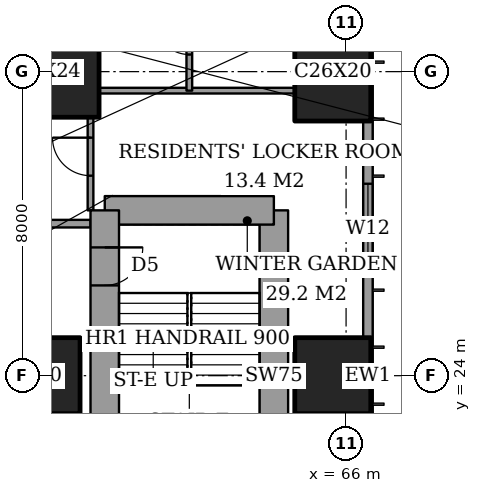
"""IFC4 building model, lengths in metres.
Left out: names, types, materials, properties, quantities, classifications, styles, units other than length and angle.
Written with IfcOpenShell. Run it as: python <this file> out.ifc"""

import sys

from ifc_helpers import new_model, si_unit, direction, frame, frame_2d, origin, origin_2d, place, context, subcontext, project, spatial, rectangle, extrude, element, fill, save


model = new_model("IFC4")
c1 = context("Model", 3, precision=1e-05, world=origin(), true_north=direction((0.0, 1.0)))
c2 = subcontext(c1, "Body", "Model", "MODEL_VIEW")
j1 = project(units=[si_unit("LENGTHUNIT", "METRE"), si_unit("PLANEANGLEUNIT", "RADIAN")], contexts=[c1])
p1 = place(None, origin())
s1 = spatial("IfcSite", under=j1, at=p1, CompositionType="ELEMENT")
p2 = place(p1, origin())
s2 = spatial("IfcBuilding", under=s1, at=p2, CompositionType="ELEMENT")
p3 = place(p2, frame((0.0, 0.0, 139.4)))
s3 = spatial("IfcBuildingStorey", under=s2, at=p3, CompositionType="ELEMENT", Elevation=139.4)
p4 = place(p3, frame((58.0, 24.0, 0.0), z_axis=(0.0, 0.0, 1.0), x_axis=(1.0, 0.0, 0.0)))
e1 = element("IfcColumn", 1, at=p4, inside=s3, PredefinedType="COLUMN", context=c2, shape_type="SweptSolid", body=[
    extrude(rectangle(XDim=2.0, YDim=2.0, at=origin_2d()), origin(), (0.0, 0.0, 1.0), 3.6),
])
p5 = place(p3, frame((58.0, 32.0, 0.0), z_axis=(0.0, 0.0, 1.0), x_axis=(1.0, 0.0, 0.0)))
e2 = element("IfcColumn", 2, at=p5, inside=s3, PredefinedType="COLUMN", context=c2, shape_type="SweptSolid", body=[
    extrude(rectangle(XDim=3.0, YDim=2.4, at=origin_2d()), origin(), (0.0, 0.0, 1.0), 3.6),
])
p6 = place(p3, frame((65.65, 24.0, 0.0), z_axis=(0.0, 0.0, 1.0), x_axis=(1.0, 0.0, 0.0)))
e3 = element("IfcColumn", 3, at=p6, inside=s3, PredefinedType="COLUMN", context=c2, shape_type="SweptSolid", body=[
    extrude(rectangle(XDim=2.0, YDim=2.0, at=origin_2d()), origin(), (0.0, 0.0, 1.0), 3.6),
])
p7 = place(p3, frame((65.65, 32.0, 0.0), z_axis=(0.0, 0.0, 1.0), x_axis=(0.0, 1.0, 0.0)))
e4 = element("IfcColumn", 4, at=p7, inside=s3, PredefinedType="COLUMN", context=c2, shape_type="SweptSolid", body=[
    extrude(rectangle(XDim=2.6, YDim=2.0, at=origin_2d()), origin(), (0.0, 0.0, 1.0), 3.6),
])
p8 = place(p3, frame((64.1, 19.65, 0.0), z_axis=(0.0, 0.0, 1.0), x_axis=(0.0, 1.0, 0.0)))
e5 = element("IfcWall", 5, at=p8, inside=s3, PredefinedType="SHEAR", context=c2, shape_type="SweptSolid", body=[
    extrude(rectangle(XDim=8.7, YDim=0.75, at=frame_2d((4.35, 0.0))), origin(), (0.0, 0.0, 1.0), 3.6),
])
p9 = place(p3, frame((64.1, 28.35, 0.0), z_axis=(0.0, 0.0, 1.0), x_axis=(-1.0, 0.0, 0.0)))
e6 = element("IfcWall", 6, at=p9, inside=s3, PredefinedType="SHEAR", context=c2, shape_type="SweptSolid", body=[
    extrude(rectangle(XDim=4.45, YDim=0.75, at=frame_2d((2.225, 0.0))), origin(), (0.0, 0.0, 1.0), 3.6),
])
p10 = place(p3, frame((59.65, 28.35, 0.0), z_axis=(0.0, 0.0, 1.0), x_axis=(0.0, -1.0, 0.0)))
e7 = element("IfcWall", 7, at=p10, inside=s3, PredefinedType="SHEAR", context=c2, shape_type="SweptSolid", body=[
    extrude(rectangle(XDim=8.7, YDim=0.75, at=frame_2d((4.35, 0.0))), origin(), (0.0, 0.0, 1.0), 3.6),
])
p11 = place(p10, frame((0.975, 0.0, 0.0)))
e8 = element("IfcOpeningElement", 8, at=p11, cuts=e7, PredefinedType="OPENING", context=c2, shape_type="SweptSolid", body=[
    extrude(rectangle(XDim=1.0, YDim=2.1, at=frame_2d((0.5, 1.05))), frame((0.0, 0.385, 0.0), z_axis=(0.0, -1.0, 0.0), x_axis=(1.0, 0.0, 0.0)), (0.0, 0.0, 1.0), 0.77),
])
p12 = place(p3, frame((66.575, 3.175, 0.0), z_axis=(0.0, 0.0, 1.0), x_axis=(0.0, 1.0, 0.0)))
e9 = element("IfcWall", 9, at=p12, inside=s3, PredefinedType="SOLIDWALL", context=c2, shape_type="SweptSolid", body=[
    extrude(rectangle(XDim=41.65, YDim=0.25, at=frame_2d((20.825, 0.0))), origin(), (0.0, 0.0, 1.0), 3.6),
])
p13 = place(p12, frame((0.775, 0.0, 0.4)))
e10 = element("IfcOpeningElement", 10, at=p13, cuts=e9, PredefinedType="OPENING", context=c2, shape_type="SweptSolid", body=[
    extrude(rectangle(XDim=2.4, YDim=2.2, at=frame_2d((1.2, 1.1))), frame((0.0, 0.135, 0.0), z_axis=(0.0, -1.0, 0.0), x_axis=(1.0, 0.0, 0.0)), (0.0, 0.0, 1.0), 0.27),
])
p14 = place(p12, frame((6.1, 0.0, 0.4)))
e11 = element("IfcOpeningElement", 11, at=p14, cuts=e9, PredefinedType="OPENING", context=c2, shape_type="SweptSolid", body=[
    extrude(rectangle(XDim=1.2, YDim=2.2, at=frame_2d((0.6, 1.1))), frame((0.0, 0.135, 0.0), z_axis=(0.0, -1.0, 0.0), x_axis=(1.0, 0.0, 0.0)), (0.0, 0.0, 1.0), 0.27),
])
p15 = place(p12, frame((8.275, 0.0, 0.4)))
e12 = element("IfcOpeningElement", 12, at=p15, cuts=e9, PredefinedType="OPENING", context=c2, shape_type="SweptSolid", body=[
    extrude(rectangle(XDim=2.4, YDim=2.2, at=frame_2d((1.2, 1.1))), frame((0.0, 0.135, 0.0), z_axis=(0.0, -1.0, 0.0), x_axis=(1.0, 0.0, 0.0)), (0.0, 0.0, 1.0), 0.27),
])
p16 = place(p12, frame((15.775, 0.0, 0.4)))
e13 = element("IfcOpeningElement", 13, at=p16, cuts=e9, PredefinedType="OPENING", context=c2, shape_type="SweptSolid", body=[
    extrude(rectangle(XDim=2.4, YDim=2.2, at=frame_2d((1.2, 1.1))), frame((0.0, 0.135, 0.0), z_axis=(0.0, -1.0, 0.0), x_axis=(1.0, 0.0, 0.0)), (0.0, 0.0, 1.0), 0.27),
])
p17 = place(p12, frame((23.475, 0.0, 0.4)))
e14 = element("IfcOpeningElement", 14, at=p17, cuts=e9, PredefinedType="OPENING", context=c2, shape_type="SweptSolid", body=[
    extrude(rectangle(XDim=2.4, YDim=2.2, at=frame_2d((1.2, 1.1))), frame((0.0, 0.135, 0.0), z_axis=(0.0, -1.0, 0.0), x_axis=(1.0, 0.0, 0.0)), (0.0, 0.0, 1.0), 0.27),
])
p18 = place(p12, frame((30.975, 0.0, 0.4)))
e15 = element("IfcOpeningElement", 15, at=p18, cuts=e9, PredefinedType="OPENING", context=c2, shape_type="SweptSolid", body=[
    extrude(rectangle(XDim=2.4, YDim=2.2, at=frame_2d((1.2, 1.1))), frame((0.0, 0.135, 0.0), z_axis=(0.0, -1.0, 0.0), x_axis=(1.0, 0.0, 0.0)), (0.0, 0.0, 1.0), 0.27),
])
p19 = place(p12, frame((34.5, 0.0, 0.4)))
e16 = element("IfcOpeningElement", 16, at=p19, cuts=e9, PredefinedType="OPENING", context=c2, shape_type="SweptSolid", body=[
    extrude(rectangle(XDim=1.2, YDim=2.2, at=frame_2d((0.6, 1.1))), frame((0.0, 0.135, 0.0), z_axis=(0.0, -1.0, 0.0), x_axis=(1.0, 0.0, 0.0)), (0.0, 0.0, 1.0), 0.27),
])
p20 = place(p12, frame((38.475, 0.0, 0.4)))
e17 = element("IfcOpeningElement", 17, at=p20, cuts=e9, PredefinedType="OPENING", context=c2, shape_type="SweptSolid", body=[
    extrude(rectangle(XDim=2.4, YDim=2.2, at=frame_2d((1.2, 1.1))), frame((0.0, 0.135, 0.0), z_axis=(0.0, -1.0, 0.0), x_axis=(1.0, 0.0, 0.0)), (0.0, 0.0, 1.0), 0.27),
])
p21 = place(p3, frame((42.0, 28.0, 0.0), z_axis=(0.0, 0.0, 1.0), x_axis=(1.0, 0.0, 0.0)))
e18 = element("IfcWall", 18, at=p21, inside=s3, PredefinedType="PARTITIONING", context=c2, shape_type="SweptSolid", body=[
    extrude(rectangle(XDim=17.275, YDim=0.2, at=frame_2d((8.637, 0.0))), origin(), (0.0, 0.0, 1.0), 3.35),
])
p22 = place(p21, frame((9.1, 0.0, 0.0)))
e19 = element("IfcOpeningElement", 19, at=p22, cuts=e18, PredefinedType="OPENING", context=c2, shape_type="SweptSolid", body=[
    extrude(rectangle(XDim=1.2, YDim=2.4, at=frame_2d((0.6, 1.2))), frame((0.0, 0.11, 0.0), z_axis=(0.0, -1.0, 0.0), x_axis=(1.0, 0.0, 0.0)), (0.0, 0.0, 1.0), 0.22),
])
p23 = place(p3, frame((59.5, 31.5, 0.0), z_axis=(0.0, 0.0, 1.0), x_axis=(1.0, 0.0, 0.0)))
e20 = element("IfcWall", 20, at=p23, inside=s3, PredefinedType="PARTITIONING", context=c2, shape_type="SweptSolid", body=[
    extrude(rectangle(XDim=5.15, YDim=0.15, at=frame_2d((2.575, 0.0))), origin(), (0.0, 0.0, 1.0), 3.35),
])
p24 = place(p3, frame((59.275, 28.35, 0.0), z_axis=(0.0, 0.0, 1.0), x_axis=(0.0, 1.0, 0.0)))
e21 = element("IfcWall", 21, at=p24, inside=s3, PredefinedType="PARTITIONING", context=c2, shape_type="SweptSolid", body=[
    extrude(rectangle(XDim=2.45, YDim=0.15, at=frame_2d((1.225, 0.0))), origin(), (0.0, 0.0, 1.0), 3.35),
])
p25 = place(p24, frame((0.913, 0.0, 0.0)))
e22 = element("IfcOpeningElement", 22, at=p25, cuts=e21, PredefinedType="OPENING", context=c2, shape_type="SweptSolid", body=[
    extrude(rectangle(XDim=1.0, YDim=2.1, at=frame_2d((0.5, 1.05))), frame((0.0, 0.085, 0.0), z_axis=(0.0, -1.0, 0.0), x_axis=(1.0, 0.0, 0.0)), (0.0, 0.0, 1.0), 0.17),
])
p26 = place(p3, frame((61.875, 31.5, 0.0), z_axis=(0.0, 0.0, 1.0), x_axis=(0.0, 1.0, 0.0)))
e23 = element("IfcWall", 23, at=p26, inside=s3, PredefinedType="PARTITIONING", context=c2, shape_type="SweptSolid", body=[
    extrude(rectangle(XDim=2.8, YDim=0.15, at=frame_2d((1.4, 0.0))), origin(), (0.0, 0.0, 1.0), 3.35),
])
p27 = place(p26, frame((0.95, 0.0, 0.0)))
e24 = element("IfcOpeningElement", 24, at=p27, cuts=e23, PredefinedType="OPENING", context=c2, shape_type="SweptSolid", body=[
    extrude(rectangle(XDim=0.9, YDim=2.1, at=frame_2d((0.45, 1.05))), frame((0.0, 0.085, 0.0), z_axis=(0.0, -1.0, 0.0), x_axis=(1.0, 0.0, 0.0)), (0.0, 0.0, 1.0), 0.17),
])
p28 = place(p17, origin())
e25 = element("IfcWindow", 25, at=p28, inside=s3, PartitioningType="SINGLE_PANEL", PredefinedType="WINDOW", context=c2, shape_type="SweptSolid", body=[
    extrude(rectangle(XDim=2.4, YDim=2.2, at=frame_2d((1.2, 1.1))), frame((0.0, 0.03, 0.0), z_axis=(0.0, -1.0, 0.0), x_axis=(1.0, 0.0, 0.0)), (0.0, 0.0, 1.0), 0.06),
])
fill(e14, e25)
p29 = place(p27, origin())
e26 = element("IfcDoor", 26, at=p29, inside=s3, OperationType="SINGLE_SWING_LEFT", PredefinedType="DOOR", context=c2, shape_type="SweptSolid", body=[
    extrude(rectangle(XDim=0.9, YDim=2.1, at=frame_2d((0.45, 1.05))), frame((0.0, 0.025, 0.0), z_axis=(0.0, -1.0, 0.0), x_axis=(1.0, 0.0, 0.0)), (0.0, 0.0, 1.0), 0.05),
])
fill(e24, e26)
p30 = place(p25, origin())
e27 = element("IfcDoor", 27, at=p30, inside=s3, OperationType="SINGLE_SWING_LEFT", PredefinedType="DOOR", context=c2, shape_type="SweptSolid", body=[
    extrude(rectangle(XDim=1.0, YDim=2.1, at=frame_2d((0.5, 1.05))), frame((0.0, 0.025, 0.0), z_axis=(0.0, -1.0, 0.0), x_axis=(1.0, 0.0, 0.0)), (0.0, 0.0, 1.0), 0.05),
])
fill(e22, e27)
p31 = place(p11, origin())
e28 = element("IfcDoor", 28, at=p31, inside=s3, OperationType="SINGLE_SWING_RIGHT", PredefinedType="DOOR", context=c2, shape_type="SweptSolid", body=[
    extrude(rectangle(XDim=1.0, YDim=2.1, at=frame_2d((0.5, 1.05))), frame((0.0, 0.025, 0.0), z_axis=(0.0, -1.0, 0.0), x_axis=(1.0, 0.0, 0.0)), (0.0, 0.0, 1.0), 0.05),
])
fill(e8, e28)
save(model, sys.argv[1])
